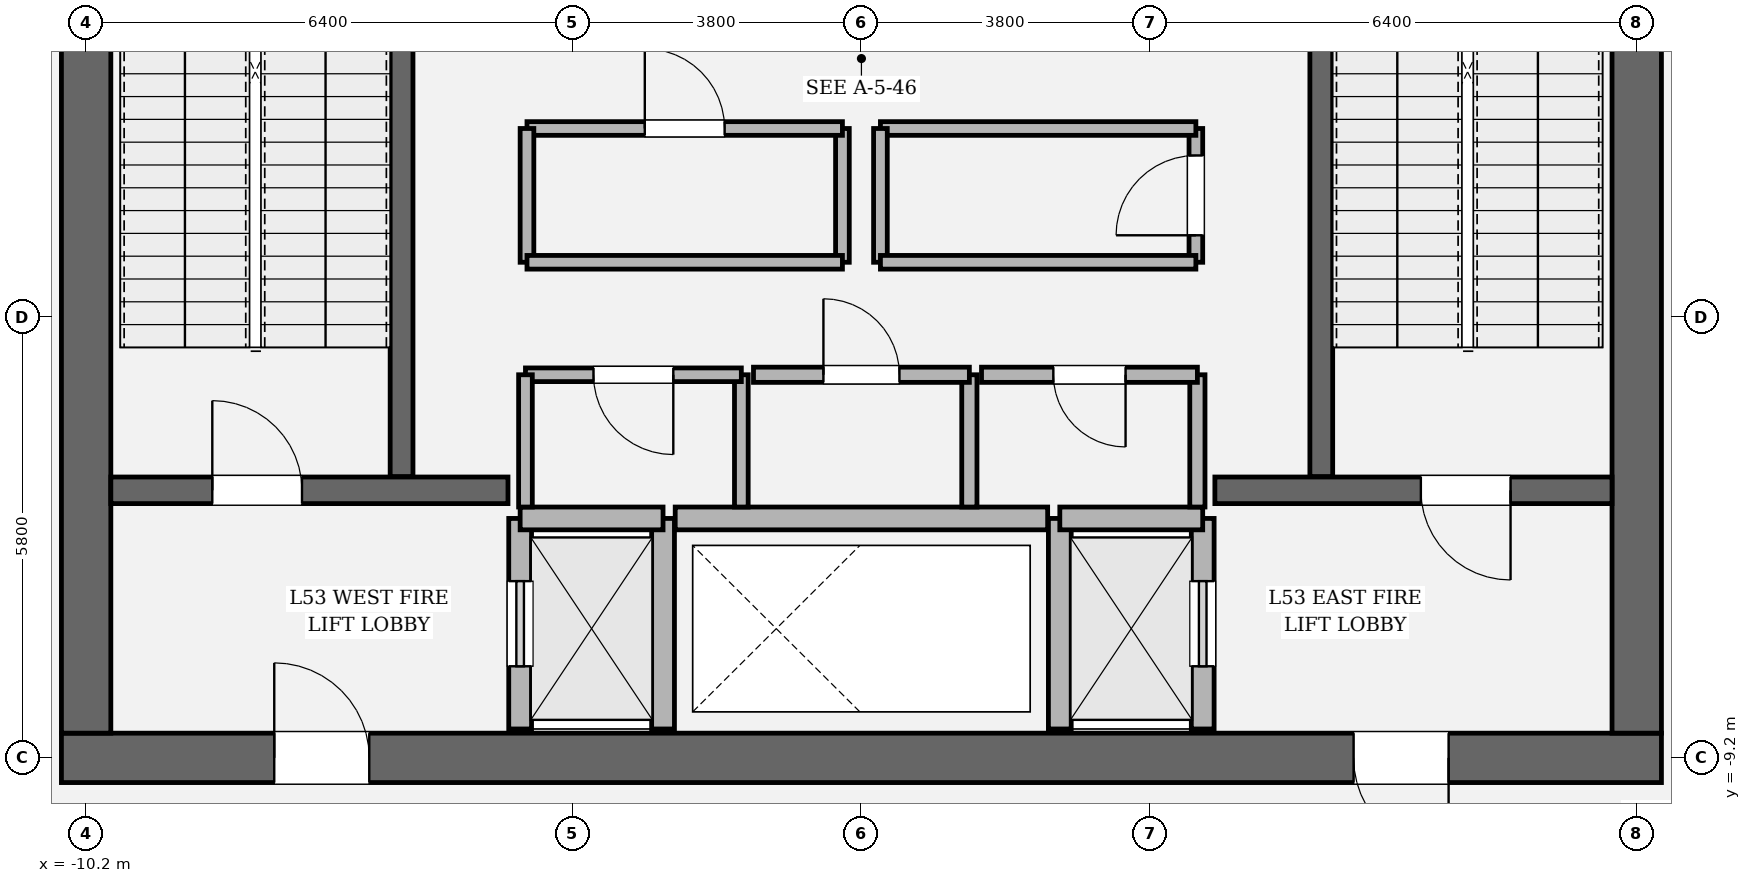
"""IFC4 building model, lengths in metres.
Left out: names, types, materials, properties, quantities, classifications, styles, units other than length and angle.
Written with IfcOpenShell. Run it as: python <this file> out.ifc"""

import sys

from ifc_helpers import new_model, si_unit, direction, frame, frame_2d, origin, place, context, subcontext, project, spatial, rectangle, extrude, element, fill, save


model = new_model("IFC4")
c1 = context("Model", 3, precision=1e-05, world=origin(), true_north=direction((0.0, 1.0)))
c2 = subcontext(c1, "Body", "Model", "MODEL_VIEW")
j1 = project(units=[si_unit("LENGTHUNIT", "METRE"), si_unit("PLANEANGLEUNIT", "RADIAN")], contexts=[c1])
p1 = place(None, origin())
s1 = spatial("IfcSite", under=j1, at=p1, CompositionType="ELEMENT")
p2 = place(p1, origin())
s2 = spatial("IfcBuilding", under=s1, at=p2, CompositionType="ELEMENT")
p3 = place(p2, frame((0.0, 0.0, 224.85)))
s3 = spatial("IfcBuildingStorey", under=s2, at=p3, CompositionType="ELEMENT", Elevation=224.85)
p4 = place(p3, frame((10.525, -9.2, 0.0), z_axis=(0.0, 0.0, 1.0), x_axis=(-1.0, 0.0, 0.0)))
e1 = element("IfcWall", 1, at=p4, inside=s3, PredefinedType="SHEAR", context=c2, shape_type="SweptSolid", body=[
    extrude(rectangle(XDim=21.05, YDim=0.65, at=frame_2d((10.525, 0.0))), origin(), (0.0, 0.0, 1.0), 4.05),
])
p5 = place(p4, frame((2.8, 0.0, 0.0)))
e2 = element("IfcOpeningElement", 2, at=p5, cuts=e1, PredefinedType="OPENING", context=c2, shape_type="SweptSolid", body=[
    extrude(rectangle(XDim=1.25, YDim=2.25, at=frame_2d((0.625, 1.125))), frame((0.0, 0.335, 0.0), z_axis=(0.0, -1.0, 0.0), x_axis=(1.0, 0.0, 0.0)), (0.0, 0.0, 1.0), 0.67),
])
p6 = place(p4, frame((17.0, 0.0, 0.0)))
e3 = element("IfcOpeningElement", 3, at=p6, cuts=e1, PredefinedType="OPENING", context=c2, shape_type="SweptSolid", body=[
    extrude(rectangle(XDim=1.25, YDim=2.25, at=frame_2d((0.625, 1.125))), frame((0.0, 0.335, 0.0), z_axis=(0.0, -1.0, 0.0), x_axis=(1.0, 0.0, 0.0)), (0.0, 0.0, 1.0), 0.67),
])
p7 = place(p3, frame((-10.2, -8.875, 0.0), z_axis=(0.0, 0.0, 1.0), x_axis=(0.0, 1.0, 0.0)))
e4 = element("IfcWall", 4, at=p7, inside=s3, PredefinedType="SHEAR", context=c2, shape_type="SweptSolid", body=[
    extrude(rectangle(XDim=17.75, YDim=0.65, at=frame_2d((8.875, 0.0))), origin(), (0.0, 0.0, 1.0), 4.05),
])
p8 = place(p7, frame((12.665, 0.0, 0.0)))
e5 = element("IfcOpeningElement", 5, at=p8, cuts=e4, PredefinedType="OPENING", context=c2, shape_type="SweptSolid", body=[
    extrude(rectangle(XDim=1.18, YDim=2.2, at=frame_2d((0.59, 1.1))), frame((0.0, 0.335, 0.0), z_axis=(0.0, -1.0, 0.0), x_axis=(1.0, 0.0, 0.0)), (0.0, 0.0, 1.0), 0.67),
])
p9 = place(p3, frame((10.2, 8.875, 0.0), z_axis=(0.0, 0.0, 1.0), x_axis=(0.0, -1.0, 0.0)))
e6 = element("IfcWall", 6, at=p9, inside=s3, PredefinedType="SHEAR", context=c2, shape_type="SweptSolid", body=[
    extrude(rectangle(XDim=17.75, YDim=0.65, at=frame_2d((8.875, 0.0))), origin(), (0.0, 0.0, 1.0), 4.05),
])
p10 = place(p9, frame((3.905, 0.0, 0.0)))
e7 = element("IfcOpeningElement", 7, at=p10, cuts=e6, PredefinedType="OPENING", context=c2, shape_type="SweptSolid", body=[
    extrude(rectangle(XDim=1.18, YDim=2.2, at=frame_2d((0.59, 1.1))), frame((0.0, 0.335, 0.0), z_axis=(0.0, -1.0, 0.0), x_axis=(1.0, 0.0, 0.0)), (0.0, 0.0, 1.0), 0.67),
])
for number, where, z_axis, x_axis in (
    (8, (-6.05, -5.5, 0.0), (0.0, 0.0, 1.0), (0.0, 1.0, 0.0)),
    (9, (6.05, 3.45, 0.0), (0.0, 0.0, 1.0), (0.0, -1.0, 0.0)),
):
    element("IfcWall", number, at=place(p3, frame(where, z_axis=z_axis, x_axis=x_axis)), inside=s3, PredefinedType="SOLIDWALL", context=c2, shape_type="SweptSolid", body=[
        extrude(rectangle(XDim=8.95, YDim=0.3, at=frame_2d((4.475, 0.0))), origin(), (0.0, 0.0, 1.0), 4.05),
    ])
p11 = place(p3, frame((-9.875, -5.68, 0.0), z_axis=(0.0, 0.0, 1.0), x_axis=(1.0, 0.0, 0.0)))
e10 = element("IfcWall", 10, at=p11, inside=s3, PredefinedType="SOLIDWALL", context=c2, shape_type="SweptSolid", body=[
    extrude(rectangle(XDim=5.225, YDim=0.35, at=frame_2d((2.613, 0.0))), origin(), (0.0, 0.0, 1.0), 4.05),
])
p12 = place(p11, frame((1.335, 0.0, 0.0)))
e11 = element("IfcOpeningElement", 11, at=p12, cuts=e10, PredefinedType="OPENING", context=c2, shape_type="SweptSolid", body=[
    extrude(rectangle(XDim=1.18, YDim=2.2, at=frame_2d((0.59, 1.1))), frame((0.0, 0.185, 0.0), z_axis=(0.0, -1.0, 0.0), x_axis=(1.0, 0.0, 0.0)), (0.0, 0.0, 1.0), 0.37),
])
p13 = place(p3, frame((4.65, -5.68, 0.0), z_axis=(0.0, 0.0, 1.0), x_axis=(1.0, 0.0, 0.0)))
e12 = element("IfcWall", 12, at=p13, inside=s3, PredefinedType="SOLIDWALL", context=c2, shape_type="SweptSolid", body=[
    extrude(rectangle(XDim=5.225, YDim=0.35, at=frame_2d((2.613, 0.0))), origin(), (0.0, 0.0, 1.0), 4.05),
])
p14 = place(p13, frame((2.71, 0.0, 0.0)))
e13 = element("IfcOpeningElement", 13, at=p14, cuts=e12, PredefinedType="OPENING", context=c2, shape_type="SweptSolid", body=[
    extrude(rectangle(XDim=1.18, YDim=2.2, at=frame_2d((0.59, 1.1))), frame((0.0, 0.185, 0.0), z_axis=(0.0, -1.0, 0.0), x_axis=(1.0, 0.0, 0.0)), (0.0, 0.0, 1.0), 0.37),
])
p15 = place(p3, frame((-4.49, -8.82, 0.0), z_axis=(0.0, 0.0, 1.0), x_axis=(0.0, 1.0, 0.0)))
e14 = element("IfcWall", 14, at=p15, inside=s3, PredefinedType="SOLIDWALL", context=c2, shape_type="SweptSolid", body=[
    extrude(rectangle(XDim=2.77, YDim=0.3, at=frame_2d((1.385, 0.0))), origin(), (0.0, 0.0, 1.0), 3.83),
])
p16 = place(p15, frame((0.825, 0.0, 0.0)))
e15 = element("IfcOpeningElement", 15, at=p16, cuts=e14, PredefinedType="OPENING", context=c2, shape_type="SweptSolid", body=[
    extrude(rectangle(XDim=1.12, YDim=2.25, at=frame_2d((0.56, 1.125))), frame((0.0, 0.16, 0.0), z_axis=(0.0, -1.0, 0.0), x_axis=(1.0, 0.0, 0.0)), (0.0, 0.0, 1.0), 0.32),
])
p17 = place(p3, frame((-2.61, -8.82, 0.0), z_axis=(0.0, 0.0, 1.0), x_axis=(0.0, 1.0, 0.0)))
e16 = element("IfcWall", 16, at=p17, inside=s3, PredefinedType="SOLIDWALL", context=c2, shape_type="SweptSolid", body=[
    extrude(rectangle(XDim=2.77, YDim=0.3, at=frame_2d((1.385, 0.0))), origin(), (0.0, 0.0, 1.0), 3.83),
])
p18 = place(p3, frame((-4.49, -6.05, 0.0), z_axis=(0.0, 0.0, 1.0), x_axis=(1.0, 0.0, 0.0)))
e17 = element("IfcWall", 17, at=p18, inside=s3, PredefinedType="SOLIDWALL", context=c2, shape_type="SweptSolid", body=[
    extrude(rectangle(XDim=1.88, YDim=0.3, at=frame_2d((0.94, 0.0))), origin(), (0.0, 0.0, 1.0), 3.83),
])
p19 = place(p3, frame((4.49, -8.82, 0.0), z_axis=(0.0, 0.0, 1.0), x_axis=(0.0, 1.0, 0.0)))
e18 = element("IfcWall", 18, at=p19, inside=s3, PredefinedType="SOLIDWALL", context=c2, shape_type="SweptSolid", body=[
    extrude(rectangle(XDim=2.77, YDim=0.3, at=frame_2d((1.385, 0.0))), origin(), (0.0, 0.0, 1.0), 3.83),
])
p20 = place(p19, frame((0.825, 0.0, 0.0)))
e19 = element("IfcOpeningElement", 19, at=p20, cuts=e18, PredefinedType="OPENING", context=c2, shape_type="SweptSolid", body=[
    extrude(rectangle(XDim=1.12, YDim=2.25, at=frame_2d((0.56, 1.125))), frame((0.0, 0.16, 0.0), z_axis=(0.0, -1.0, 0.0), x_axis=(1.0, 0.0, 0.0)), (0.0, 0.0, 1.0), 0.32),
])
p21 = place(p3, frame((2.61, -8.82, 0.0), z_axis=(0.0, 0.0, 1.0), x_axis=(0.0, 1.0, 0.0)))
e20 = element("IfcWall", 20, at=p21, inside=s3, PredefinedType="SOLIDWALL", context=c2, shape_type="SweptSolid", body=[
    extrude(rectangle(XDim=2.77, YDim=0.3, at=frame_2d((1.385, 0.0))), origin(), (0.0, 0.0, 1.0), 3.83),
])
p22 = place(p3, frame((2.61, -6.05, 0.0), z_axis=(0.0, 0.0, 1.0), x_axis=(1.0, 0.0, 0.0)))
e21 = element("IfcWall", 21, at=p22, inside=s3, PredefinedType="SOLIDWALL", context=c2, shape_type="SweptSolid", body=[
    extrude(rectangle(XDim=1.88, YDim=0.3, at=frame_2d((0.94, 0.0))), origin(), (0.0, 0.0, 1.0), 3.83),
])
p23 = place(p3, frame((-2.45, -6.05, 0.0), z_axis=(0.0, 0.0, 1.0), x_axis=(1.0, 0.0, 0.0)))
e22 = element("IfcWall", 22, at=p23, inside=s3, PredefinedType="SOLIDWALL", context=c2, shape_type="SweptSolid", body=[
    extrude(rectangle(XDim=4.9, YDim=0.3, at=frame_2d((2.45, 0.0))), origin(), (0.0, 0.0, 1.0), 3.83),
])
p24 = place(p3, frame((-1.58, -5.9, 0.0), z_axis=(0.0, 0.0, 1.0), x_axis=(0.0, 1.0, 0.0)))
e23 = element("IfcWall", 23, at=p24, inside=s3, PredefinedType="PARTITIONING", context=c2, shape_type="SweptSolid", body=[
    extrude(rectangle(XDim=1.74, YDim=0.18, at=frame_2d((0.87, 0.0))), origin(), (0.0, 0.0, 1.0), 3.83),
])
p25 = place(p3, frame((-1.58, -4.16, 0.0), z_axis=(0.0, 0.0, 1.0), x_axis=(-1.0, 0.0, 0.0)))
e24 = element("IfcWall", 24, at=p25, inside=s3, PredefinedType="PARTITIONING", context=c2, shape_type="SweptSolid", body=[
    extrude(rectangle(XDim=2.84, YDim=0.18, at=frame_2d((1.42, 0.0))), origin(), (0.0, 0.0, 1.0), 3.83),
])
p26 = place(p25, frame((0.895, 0.0, 0.0)))
e25 = element("IfcOpeningElement", 25, at=p26, cuts=e24, PredefinedType="OPENING", context=c2, shape_type="SweptSolid", body=[
    extrude(rectangle(XDim=1.05, YDim=2.2, at=frame_2d((0.525, 1.1))), frame((0.0, 0.1, 0.0), z_axis=(0.0, -1.0, 0.0), x_axis=(1.0, 0.0, 0.0)), (0.0, 0.0, 1.0), 0.2),
])
p27 = place(p3, frame((-4.42, -4.16, 0.0), z_axis=(0.0, 0.0, 1.0), x_axis=(0.0, -1.0, 0.0)))
e26 = element("IfcWall", 26, at=p27, inside=s3, PredefinedType="PARTITIONING", context=c2, shape_type="SweptSolid", body=[
    extrude(rectangle(XDim=1.74, YDim=0.18, at=frame_2d((0.87, 0.0))), origin(), (0.0, 0.0, 1.0), 3.83),
])
p28 = place(p3, frame((1.42, -5.9, 0.0), z_axis=(0.0, 0.0, 1.0), x_axis=(0.0, 1.0, 0.0)))
e27 = element("IfcWall", 27, at=p28, inside=s3, PredefinedType="SOLIDWALL", context=c2, shape_type="SweptSolid", body=[
    extrude(rectangle(XDim=1.74, YDim=0.2, at=frame_2d((0.87, 0.0))), origin(), (0.0, 0.0, 1.0), 3.83),
])
p29 = place(p3, frame((1.42, -4.16, 0.0), z_axis=(0.0, 0.0, 1.0), x_axis=(-1.0, 0.0, 0.0)))
e28 = element("IfcWall", 28, at=p29, inside=s3, PredefinedType="SOLIDWALL", context=c2, shape_type="SweptSolid", body=[
    extrude(rectangle(XDim=2.84, YDim=0.2, at=frame_2d((1.42, 0.0))), origin(), (0.0, 0.0, 1.0), 3.83),
])
p30 = place(p29, frame((0.92, 0.0, 0.0)))
e29 = element("IfcOpeningElement", 29, at=p30, cuts=e28, PredefinedType="OPENING", context=c2, shape_type="SweptSolid", body=[
    extrude(rectangle(XDim=1.0, YDim=2.15, at=frame_2d((0.5, 1.075))), frame((0.0, 0.11, 0.0), z_axis=(0.0, -1.0, 0.0), x_axis=(1.0, 0.0, 0.0)), (0.0, 0.0, 1.0), 0.22),
])
p31 = place(p3, frame((4.42, -5.9, 0.0), z_axis=(0.0, 0.0, 1.0), x_axis=(0.0, 1.0, 0.0)))
e30 = element("IfcWall", 30, at=p31, inside=s3, PredefinedType="SOLIDWALL", context=c2, shape_type="SweptSolid", body=[
    extrude(rectangle(XDim=1.74, YDim=0.2, at=frame_2d((0.87, 0.0))), origin(), (0.0, 0.0, 1.0), 3.83),
])
p32 = place(p3, frame((4.42, -4.16, 0.0), z_axis=(0.0, 0.0, 1.0), x_axis=(-1.0, 0.0, 0.0)))
e31 = element("IfcWall", 31, at=p32, inside=s3, PredefinedType="SOLIDWALL", context=c2, shape_type="SweptSolid", body=[
    extrude(rectangle(XDim=2.84, YDim=0.2, at=frame_2d((1.42, 0.0))), origin(), (0.0, 0.0, 1.0), 3.83),
])
p33 = place(p32, frame((0.945, 0.0, 0.0)))
e32 = element("IfcOpeningElement", 32, at=p33, cuts=e31, PredefinedType="OPENING", context=c2, shape_type="SweptSolid", body=[
    extrude(rectangle(XDim=0.95, YDim=2.15, at=frame_2d((0.475, 1.075))), frame((0.0, 0.11, 0.0), z_axis=(0.0, -1.0, 0.0), x_axis=(1.0, 0.0, 0.0)), (0.0, 0.0, 1.0), 0.22),
])
p34 = place(p3, frame((-0.25, -2.68, 0.0), z_axis=(0.0, 0.0, 1.0), x_axis=(0.0, 1.0, 0.0)))
e33 = element("IfcWall", 33, at=p34, inside=s3, PredefinedType="PARTITIONING", context=c2, shape_type="SweptSolid", body=[
    extrude(rectangle(XDim=1.76, YDim=0.18, at=frame_2d((0.88, 0.0))), origin(), (0.0, 0.0, 1.0), 3.83),
])
p35 = place(p3, frame((-0.25, -0.92, 0.0), z_axis=(0.0, 0.0, 1.0), x_axis=(-1.0, 0.0, 0.0)))
e34 = element("IfcWall", 34, at=p35, inside=s3, PredefinedType="PARTITIONING", context=c2, shape_type="SweptSolid", body=[
    extrude(rectangle(XDim=4.15, YDim=0.18, at=frame_2d((2.075, 0.0))), origin(), (0.0, 0.0, 1.0), 3.83),
])
p36 = place(p35, frame((1.55, 0.0, 0.0)))
e35 = element("IfcOpeningElement", 35, at=p36, cuts=e34, PredefinedType="OPENING", context=c2, shape_type="SweptSolid", body=[
    extrude(rectangle(XDim=1.05, YDim=2.2, at=frame_2d((0.525, 1.1))), frame((0.0, 0.1, 0.0), z_axis=(0.0, -1.0, 0.0), x_axis=(1.0, 0.0, 0.0)), (0.0, 0.0, 1.0), 0.2),
])
p37 = place(p3, frame((-4.4, -0.92, 0.0), z_axis=(0.0, 0.0, 1.0), x_axis=(0.0, -1.0, 0.0)))
e36 = element("IfcWall", 36, at=p37, inside=s3, PredefinedType="PARTITIONING", context=c2, shape_type="SweptSolid", body=[
    extrude(rectangle(XDim=1.76, YDim=0.18, at=frame_2d((0.88, 0.0))), origin(), (0.0, 0.0, 1.0), 3.83),
])
p38 = place(p3, frame((-4.4, -2.68, 0.0), z_axis=(0.0, 0.0, 1.0), x_axis=(1.0, 0.0, 0.0)))
e37 = element("IfcWall", 37, at=p38, inside=s3, PredefinedType="PARTITIONING", context=c2, shape_type="SweptSolid", body=[
    extrude(rectangle(XDim=4.15, YDim=0.18, at=frame_2d((2.075, 0.0))), origin(), (0.0, 0.0, 1.0), 3.83),
])
p39 = place(p3, frame((4.4, -2.68, 0.0), z_axis=(0.0, 0.0, 1.0), x_axis=(0.0, 1.0, 0.0)))
e38 = element("IfcWall", 38, at=p39, inside=s3, PredefinedType="PARTITIONING", context=c2, shape_type="SweptSolid", body=[
    extrude(rectangle(XDim=1.76, YDim=0.18, at=frame_2d((0.88, 0.0))), origin(), (0.0, 0.0, 1.0), 3.83),
])
p40 = place(p39, frame((0.355, 0.0, 0.0)))
e39 = element("IfcOpeningElement", 39, at=p40, cuts=e38, PredefinedType="OPENING", context=c2, shape_type="SweptSolid", body=[
    extrude(rectangle(XDim=1.05, YDim=2.2, at=frame_2d((0.525, 1.1))), frame((0.0, 0.1, 0.0), z_axis=(0.0, -1.0, 0.0), x_axis=(1.0, 0.0, 0.0)), (0.0, 0.0, 1.0), 0.2),
])
p41 = place(p3, frame((4.4, -0.92, 0.0), z_axis=(0.0, 0.0, 1.0), x_axis=(-1.0, 0.0, 0.0)))
e40 = element("IfcWall", 40, at=p41, inside=s3, PredefinedType="PARTITIONING", context=c2, shape_type="SweptSolid", body=[
    extrude(rectangle(XDim=4.15, YDim=0.18, at=frame_2d((2.075, 0.0))), origin(), (0.0, 0.0, 1.0), 3.83),
])
p42 = place(p3, frame((0.25, -0.92, 0.0), z_axis=(0.0, 0.0, 1.0), x_axis=(0.0, -1.0, 0.0)))
e41 = element("IfcWall", 41, at=p42, inside=s3, PredefinedType="PARTITIONING", context=c2, shape_type="SweptSolid", body=[
    extrude(rectangle(XDim=1.76, YDim=0.18, at=frame_2d((0.88, 0.0))), origin(), (0.0, 0.0, 1.0), 3.83),
])
p43 = place(p3, frame((0.25, -2.68, 0.0), z_axis=(0.0, 0.0, 1.0), x_axis=(1.0, 0.0, 0.0)))
e42 = element("IfcWall", 42, at=p43, inside=s3, PredefinedType="PARTITIONING", context=c2, shape_type="SweptSolid", body=[
    extrude(rectangle(XDim=4.15, YDim=0.18, at=frame_2d((2.075, 0.0))), origin(), (0.0, 0.0, 1.0), 3.83),
])
p44 = place(p12, origin())
e43 = element("IfcDoor", 43, at=p44, inside=s3, OperationType="SINGLE_SWING_LEFT", PredefinedType="DOOR", context=c2, shape_type="SweptSolid", body=[
    extrude(rectangle(XDim=1.18, YDim=2.2, at=frame_2d((0.59, 1.1))), frame((0.0, 0.025, 0.0), z_axis=(0.0, -1.0, 0.0), x_axis=(1.0, 0.0, 0.0)), (0.0, 0.0, 1.0), 0.05),
])
fill(e11, e43)
p45 = place(p14, origin())
e44 = element("IfcDoor", 44, at=p45, inside=s3, OperationType="SINGLE_SWING_RIGHT", PredefinedType="DOOR", context=c2, shape_type="SweptSolid", body=[
    extrude(rectangle(XDim=1.18, YDim=2.2, at=frame_2d((0.59, 1.1))), frame((0.0, 0.025, 0.0), z_axis=(0.0, -1.0, 0.0), x_axis=(1.0, 0.0, 0.0)), (0.0, 0.0, 1.0), 0.05),
])
fill(e13, e44)
p46 = place(p5, origin())
e45 = element("IfcDoor", 45, at=p46, inside=s3, OperationType="SINGLE_SWING_LEFT", PredefinedType="DOOR", context=c2, shape_type="SweptSolid", body=[
    extrude(rectangle(XDim=1.25, YDim=2.25, at=frame_2d((0.625, 1.125))), frame((0.0, 0.025, 0.0), z_axis=(0.0, -1.0, 0.0), x_axis=(1.0, 0.0, 0.0)), (0.0, 0.0, 1.0), 0.05),
])
fill(e2, e45)
p47 = place(p6, origin())
e46 = element("IfcDoor", 46, at=p47, inside=s3, OperationType="SINGLE_SWING_RIGHT", PredefinedType="DOOR", context=c2, shape_type="SweptSolid", body=[
    extrude(rectangle(XDim=1.25, YDim=2.25, at=frame_2d((0.625, 1.125))), frame((0.0, 0.025, 0.0), z_axis=(0.0, -1.0, 0.0), x_axis=(1.0, 0.0, 0.0)), (0.0, 0.0, 1.0), 0.05),
])
fill(e3, e46)
p48 = place(p16, origin())
e47 = element("IfcDoor", 47, at=p48, inside=s3, OperationType="SLIDING_TO_LEFT", PredefinedType="DOOR", context=c2, shape_type="SweptSolid", body=[
    extrude(rectangle(XDim=1.12, YDim=2.25, at=frame_2d((0.56, 1.125))), frame((0.0, 0.025, 0.0), z_axis=(0.0, -1.0, 0.0), x_axis=(1.0, 0.0, 0.0)), (0.0, 0.0, 1.0), 0.05),
])
fill(e15, e47)
p49 = place(p20, origin())
e48 = element("IfcDoor", 48, at=p49, inside=s3, OperationType="SLIDING_TO_RIGHT", PredefinedType="DOOR", context=c2, shape_type="SweptSolid", body=[
    extrude(rectangle(XDim=1.12, YDim=2.25, at=frame_2d((0.56, 1.125))), frame((0.0, 0.025, 0.0), z_axis=(0.0, -1.0, 0.0), x_axis=(1.0, 0.0, 0.0)), (0.0, 0.0, 1.0), 0.05),
])
fill(e19, e48)
p50 = place(p26, origin())
e49 = element("IfcDoor", 49, at=p50, inside=s3, OperationType="SINGLE_SWING_LEFT", PredefinedType="DOOR", context=c2, shape_type="SweptSolid", body=[
    extrude(rectangle(XDim=1.05, YDim=2.2, at=frame_2d((0.525, 1.1))), frame((0.0, 0.025, 0.0), z_axis=(0.0, -1.0, 0.0), x_axis=(1.0, 0.0, 0.0)), (0.0, 0.0, 1.0), 0.05),
])
fill(e25, e49)
p51 = place(p30, origin())
e50 = element("IfcDoor", 50, at=p51, inside=s3, OperationType="SINGLE_SWING_RIGHT", PredefinedType="DOOR", context=c2, shape_type="SweptSolid", body=[
    extrude(rectangle(XDim=1.0, YDim=2.15, at=frame_2d((0.5, 1.075))), frame((0.0, 0.025, 0.0), z_axis=(0.0, -1.0, 0.0), x_axis=(1.0, 0.0, 0.0)), (0.0, 0.0, 1.0), 0.05),
])
fill(e29, e50)
p52 = place(p33, origin())
e51 = element("IfcDoor", 51, at=p52, inside=s3, OperationType="SINGLE_SWING_LEFT", PredefinedType="DOOR", context=c2, shape_type="SweptSolid", body=[
    extrude(rectangle(XDim=0.95, YDim=2.15, at=frame_2d((0.475, 1.075))), frame((0.0, 0.025, 0.0), z_axis=(0.0, -1.0, 0.0), x_axis=(1.0, 0.0, 0.0)), (0.0, 0.0, 1.0), 0.05),
])
fill(e32, e51)
p53 = place(p36, origin())
e52 = element("IfcDoor", 52, at=p53, inside=s3, OperationType="SINGLE_SWING_RIGHT", PredefinedType="DOOR", context=c2, shape_type="SweptSolid", body=[
    extrude(rectangle(XDim=1.05, YDim=2.2, at=frame_2d((0.525, 1.1))), frame((0.0, 0.025, 0.0), z_axis=(0.0, -1.0, 0.0), x_axis=(1.0, 0.0, 0.0)), (0.0, 0.0, 1.0), 0.05),
])
fill(e35, e52)
p54 = place(p40, origin())
e53 = element("IfcDoor", 53, at=p54, inside=s3, OperationType="SINGLE_SWING_LEFT", PredefinedType="DOOR", context=c2, shape_type="SweptSolid", body=[
    extrude(rectangle(XDim=1.05, YDim=2.2, at=frame_2d((0.525, 1.1))), frame((0.0, 0.025, 0.0), z_axis=(0.0, -1.0, 0.0), x_axis=(1.0, 0.0, 0.0)), (0.0, 0.0, 1.0), 0.05),
])
fill(e39, e53)
save(model, sys.argv[1])
